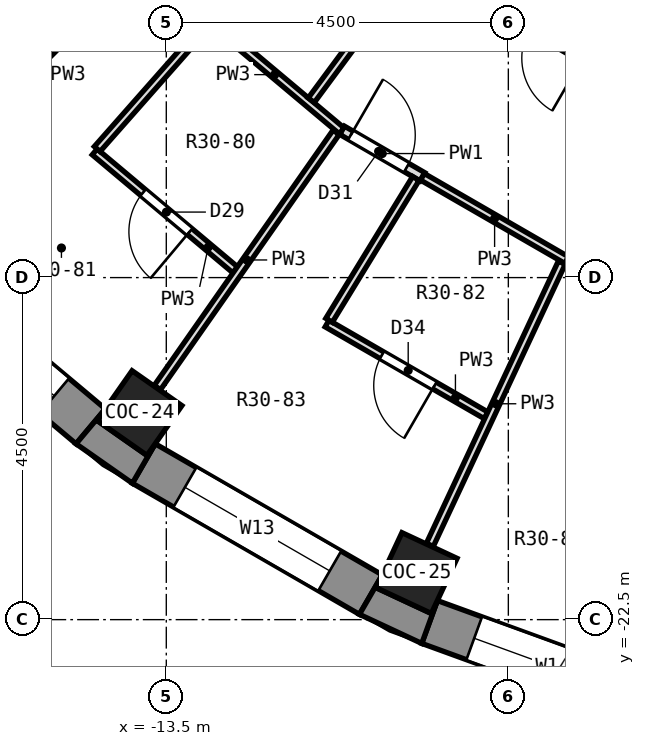
"""IFC4 building model, lengths in metres.
Left out: names, types, materials, properties, quantities, classifications, styles, units other than length and angle.
Written with IfcOpenShell. Run it as: python <this file> out.ifc"""

import sys

from ifc_helpers import new_model, si_unit, direction, frame, frame_2d, origin, origin_2d, place, context, subcontext, project, spatial, polyline, rectangle, outline, extrude, element, fill, save


model = new_model("IFC4")
c1 = context("Model", 3, precision=1e-05, world=origin(), true_north=direction((0.0, 1.0)))
c2 = subcontext(c1, "Body", "Model", "MODEL_VIEW")
j1 = project(units=[si_unit("LENGTHUNIT", "METRE"), si_unit("PLANEANGLEUNIT", "RADIAN")], contexts=[c1])
p1 = place(None, origin())
s1 = spatial("IfcSite", under=j1, at=p1, CompositionType="ELEMENT")
p2 = place(p1, origin())
s2 = spatial("IfcBuilding", under=s1, at=p2, CompositionType="ELEMENT")
p3 = place(p2, frame((0.0, 0.0, 210.3)))
s3 = spatial("IfcBuildingStorey", under=s2, at=p3, CompositionType="ELEMENT", Elevation=210.3)
for number, where, z_axis, x_axis in (
    (1, (-13.852, -19.782, 0.0), (0.0, 0.0, 1.0), (-0.574, -0.819, 0.0)),
    (2, (-10.206, -21.887, 0.0), (0.0, 0.0, 1.0), (-0.423, -0.906, 0.0)),
):
    element("IfcColumn", number, at=place(p3, frame(where, z_axis=z_axis, x_axis=x_axis)), inside=s3, PredefinedType="COLUMN", context=c2, shape_type="SweptSolid", body=[
        extrude(rectangle(XDim=0.8, YDim=0.8, at=origin_2d()), origin(), (0.0, 0.0, 1.0), 3.3),
    ])
p4 = place(p3, frame((-17.137, -17.74, 0.0), z_axis=(0.0, 0.0, 1.0), x_axis=(0.766058884809, -0.642770398358, 0.0)))
e3 = element("IfcWall", 3, at=p4, inside=s3, PredefinedType="SOLIDWALL", context=c2, shape_type="SweptSolid", body=[
    extrude(rectangle(XDim=3.449, YDim=0.6, at=frame_2d((1.725, 0.0))), origin(), (0.0, 0.0, 1.0), 2.85),
])
p5 = place(p4, frame((0.625, 0.0, 0.9)))
e4 = element("IfcOpeningElement", 4, at=p5, cuts=e3, PredefinedType="OPENING", context=c2, shape_type="SweptSolid", body=[
    extrude(rectangle(XDim=2.2, YDim=1.8, at=frame_2d((1.1, 0.9))), frame((0.0, 0.312, 0.0), z_axis=(0.0, -1.0, 0.0), x_axis=(1.0, 0.0, 0.0)), (0.0, 0.0, 1.0), 0.624),
])
p6 = place(p3, frame((-13.796, -20.446, 0.0), z_axis=(0.0, 0.0, 1.0), x_axis=(0.86602648383, -0.499998129301, 0.0)))
e5 = element("IfcWall", 5, at=p6, inside=s3, PredefinedType="SOLIDWALL", context=c2, shape_type="SweptSolid", body=[
    extrude(rectangle(XDim=3.45, YDim=0.6, at=frame_2d((1.725, 0.0))), origin(), (0.0, 0.0, 1.0), 2.85),
])
p7 = place(p6, frame((0.625, 0.0, 0.9)))
e6 = element("IfcOpeningElement", 6, at=p7, cuts=e5, PredefinedType="OPENING", context=c2, shape_type="SweptSolid", body=[
    extrude(rectangle(XDim=2.2, YDim=1.8, at=frame_2d((1.1, 0.9))), frame((0.0, 0.312, 0.0), z_axis=(0.0, -1.0, 0.0), x_axis=(1.0, 0.0, 0.0)), (0.0, 0.0, 1.0), 0.624),
])
p8 = place(p3, frame((-10.036, -22.531, 0.0), z_axis=(0.0, 0.0, 1.0), x_axis=(0.93968799822, -0.342032843455, 0.0)))
e7 = element("IfcWall", 7, at=p8, inside=s3, PredefinedType="SOLIDWALL", context=c2, shape_type="SweptSolid", body=[
    extrude(rectangle(XDim=3.45, YDim=0.6, at=frame_2d((1.725, 0.0))), origin(), (0.0, 0.0, 1.0), 2.85),
])
p9 = place(p8, frame((0.625, 0.0, 0.9)))
e8 = element("IfcOpeningElement", 8, at=p9, cuts=e7, PredefinedType="OPENING", context=c2, shape_type="SweptSolid", body=[
    extrude(rectangle(XDim=2.2, YDim=1.8, at=frame_2d((1.1, 0.9))), frame((0.0, 0.312, 0.0), z_axis=(0.0, -1.0, 0.0), x_axis=(1.0, 0.0, 0.0)), (0.0, 0.0, 1.0), 0.624),
])
p10 = place(p3, origin())
e9 = element("IfcWall", 9, at=p10, inside=s3, PredefinedType="SOLIDWALL", context=c2, shape_type="SweptSolid", body=[
    extrude(outline(polyline([(-14.687, -20.187), (-13.946, -20.706), (-13.646, -20.186), (-13.754, -20.34), (-14.409, -19.881), (-14.302, -19.727), (-14.687, -20.187)])), origin(), (0.0, 0.0, 1.0), 2.85),
])
p11 = place(p3, origin())
e10 = element("IfcWall", 10, at=p11, inside=s3, PredefinedType="SOLIDWALL", context=c2, shape_type="SweptSolid", body=[
    extrude(outline(polyline([(-10.139, -22.813), (-9.934, -22.249), (-10.013, -22.419), (-10.738, -22.081), (-10.659, -21.911), (-10.959, -22.431), (-10.139, -22.813)])), origin(), (0.0, 0.0, 1.0), 2.85),
])
p12 = place(p3, frame((-14.442, -16.346, 0.0), z_axis=(0.0, 0.0, 1.0), x_axis=(0.765878189611, -0.642985690882, 0.0)))
e11 = element("IfcWall", 11, at=p12, inside=s3, PredefinedType="PARTITIONING", context=c2, shape_type="SweptSolid", body=[
    extrude(rectangle(XDim=2.414, YDim=0.1, at=frame_2d((1.207, 0.0))), origin(), (0.0, 0.0, 1.0), 2.85),
])
p13 = place(p12, frame((0.832, 0.0, 0.0)))
e12 = element("IfcOpeningElement", 12, at=p13, cuts=e11, PredefinedType="OPENING", context=c2, shape_type="SweptSolid", body=[
    extrude(rectangle(XDim=0.8, YDim=2.1, at=frame_2d((0.4, 1.05))), frame((0.0, 0.062, 0.0), z_axis=(0.0, -1.0, 0.0), x_axis=(1.0, 0.0, 0.0)), (0.0, 0.0, 1.0), 0.124),
])
p14 = place(p3, frame((-12.957, -14.589, 0.0), z_axis=(0.0, 0.0, 1.0), x_axis=(0.766099024104, -0.642722556993, 0.0)))
e13 = element("IfcWall", 13, at=p14, inside=s3, PredefinedType="PARTITIONING", context=c2, shape_type="SweptSolid", body=[
    extrude(rectangle(XDim=2.305, YDim=0.1, at=frame_2d((1.153, 0.0))), origin(), (0.0, 0.0, 1.0), 2.85),
])
p15 = place(p3, frame((-11.186, -16.062, 0.0), z_axis=(0.0, 0.0, 1.0), x_axis=(0.865261949816, -0.501320015759, 0.0)))
e14 = element("IfcWall", 14, at=p15, inside=s3, PredefinedType="PARTITIONING", context=c2, shape_type="SweptSolid", body=[
    extrude(rectangle(XDim=1.221, YDim=0.125, at=frame_2d((0.61, 0.0))), origin(), (0.0, 0.0, 1.0), 2.85),
])
p16 = place(p15, frame((0.129, 0.0, 0.0)))
e15 = element("IfcOpeningElement", 15, at=p16, cuts=e14, PredefinedType="OPENING", context=c2, shape_type="SweptSolid", body=[
    extrude(rectangle(XDim=0.85, YDim=2.1, at=frame_2d((0.425, 1.05))), frame((0.0, 0.074, 0.0), z_axis=(0.0, -1.0, 0.0), x_axis=(1.0, 0.0, 0.0)), (0.0, 0.0, 1.0), 0.149),
])
p17 = place(p3, frame((-11.385, -18.605, 0.0), z_axis=(0.0, 0.0, 1.0), x_axis=(0.866145191815, -0.499792463624, 0.0)))
e16 = element("IfcWall", 16, at=p17, inside=s3, PredefinedType="PARTITIONING", context=c2, shape_type="SweptSolid", body=[
    extrude(rectangle(XDim=2.415, YDim=0.1, at=frame_2d((1.208, 0.0))), origin(), (0.0, 0.0, 1.0), 2.85),
])
p18 = place(p17, frame((0.833, 0.0, 0.0)))
e17 = element("IfcOpeningElement", 17, at=p18, cuts=e16, PredefinedType="OPENING", context=c2, shape_type="SweptSolid", body=[
    extrude(rectangle(XDim=0.8, YDim=2.1, at=frame_2d((0.4, 1.05))), frame((0.0, 0.062, 0.0), z_axis=(0.0, -1.0, 0.0), x_axis=(1.0, 0.0, 0.0)), (0.0, 0.0, 1.0), 0.124),
])
p19 = place(p3, frame((-10.13, -16.674, 0.0), z_axis=(0.0, 0.0, 1.0), x_axis=(0.866104006239, -0.499863831834, 0.0)))
e18 = element("IfcWall", 18, at=p19, inside=s3, PredefinedType="PARTITIONING", context=c2, shape_type="SweptSolid", body=[
    extrude(rectangle(XDim=2.192, YDim=0.1, at=frame_2d((1.096, 0.0))), origin(), (0.0, 0.0, 1.0), 2.85),
])
p20 = place(p3, frame((-9.326, -14.361, 0.0), z_axis=(0.0, 0.0, 1.0), x_axis=(0.866099077695, -0.499872371326, 0.0)))
e19 = element("IfcWall", 19, at=p20, inside=s3, PredefinedType="PARTITIONING", context=c2, shape_type="SweptSolid", body=[
    extrude(rectangle(XDim=2.208, YDim=0.1, at=frame_2d((1.104, 0.0))), origin(), (0.0, 0.0, 1.0), 2.85),
])
p21 = place(p20, frame((0.704, 0.0, 0.0)))
e20 = element("IfcOpeningElement", 20, at=p21, cuts=e19, PredefinedType="OPENING", context=c2, shape_type="SweptSolid", body=[
    extrude(rectangle(XDim=0.8, YDim=2.1, at=frame_2d((0.4, 1.05))), frame((0.0, 0.062, 0.0), z_axis=(0.0, -1.0, 0.0), x_axis=(1.0, 0.0, 0.0)), (0.0, 0.0, 1.0), 0.124),
])
p22 = place(p3, frame((-10.927, -11.012, 0.0), z_axis=(0.0, 0.0, 1.0), x_axis=(0.866043138087, -0.49996928203, 0.0)))
e21 = element("IfcWall", 21, at=p22, inside=s3, PredefinedType="PARTITIONING", context=c2, shape_type="SweptSolid", body=[
    extrude(rectangle(XDim=8.048, YDim=0.125, at=frame_2d((4.024, 0.0))), origin(), (0.0, 0.0, 1.0), 2.85),
])
p23 = place(p22, frame((6.042, 0.0, 0.0)))
e22 = element("IfcOpeningElement", 22, at=p23, cuts=e21, PredefinedType="OPENING", context=c2, shape_type="SweptSolid", body=[
    extrude(rectangle(XDim=1.0, YDim=2.1, at=frame_2d((0.5, 1.05))), frame((0.0, 0.074, 0.0), z_axis=(0.0, -1.0, 0.0), x_axis=(1.0, 0.0, 0.0)), (0.0, 0.0, 1.0), 0.149),
])
p24 = place(p3, frame((-16.787, -16.787, 0.0), z_axis=(0.0, 0.0, 1.0), x_axis=(0.707106781187, 0.707106781187, 0.0)))
e23 = element("IfcWall", 23, at=p24, inside=s3, PredefinedType="PARTITIONING", context=c2, shape_type="SweptSolid", body=[
    extrude(rectangle(XDim=4.098, YDim=0.1, at=frame_2d((2.049, 0.0))), origin(), (0.0, 0.0, 1.0), 2.85),
])
p25 = place(p3, frame((-14.409, -16.309, 0.0), z_axis=(0.0, 0.0, 1.0), x_axis=(0.661846667472, 0.749639239072, 0.0)))
e24 = element("IfcWall", 24, at=p25, inside=s3, PredefinedType="PARTITIONING", context=c2, shape_type="SweptSolid", body=[
    extrude(rectangle(XDim=2.188, YDim=0.1, at=frame_2d((1.094, 0.0))), origin(), (0.0, 0.0, 1.0), 2.85),
])
p26 = place(p3, frame((-11.593, -15.667, 0.0), z_axis=(0.0, 0.0, 1.0), x_axis=(0.594790535758, 0.803880724096, 0.0)))
e25 = element("IfcWall", 25, at=p26, inside=s3, PredefinedType="PARTITIONING", context=c2, shape_type="SweptSolid", body=[
    extrude(rectangle(XDim=4.33, YDim=0.1, at=frame_2d((2.165, 0.0))), origin(), (0.0, 0.0, 1.0), 2.85),
])
p27 = place(p26, frame((1.421, 0.0, 0.0)))
e26 = element("IfcOpeningElement", 26, at=p27, cuts=e25, PredefinedType="OPENING", context=c2, shape_type="SweptSolid", body=[
    extrude(rectangle(XDim=0.9, YDim=2.1, at=frame_2d((0.45, 1.05))), frame((0.0, 0.062, 0.0), z_axis=(0.0, -1.0, 0.0), x_axis=(1.0, 0.0, 0.0)), (0.0, 0.0, 1.0), 0.124),
])
p28 = place(p3, frame((-13.617, -19.447, 0.0), z_axis=(0.0, 0.0, 1.0), x_axis=(0.573606249772, 0.819131167898, 0.0)))
e27 = element("IfcWall", 27, at=p28, inside=s3, PredefinedType="PARTITIONING", context=c2, shape_type="SweptSolid", body=[
    extrude(rectangle(XDim=4.099, YDim=0.1, at=frame_2d((2.049, 0.0))), origin(), (0.0, 0.0, 1.0), 2.85),
])
p29 = place(p3, frame((-11.359, -18.562, 0.0), z_axis=(0.0, 0.0, 1.0), x_axis=(0.522122387349, 0.852870572026, 0.0)))
e28 = element("IfcWall", 28, at=p29, inside=s3, PredefinedType="PARTITIONING", context=c2, shape_type="SweptSolid", body=[
    extrude(rectangle(XDim=2.188, YDim=0.1, at=frame_2d((1.094, 0.0))), origin(), (0.0, 0.0, 1.0), 2.85),
])
p30 = place(p3, frame((-10.032, -21.516, 0.0), z_axis=(0.0, 0.0, 1.0), x_axis=(0.423514808753, 0.90588918018, 0.0)))
e29 = element("IfcWall", 29, at=p30, inside=s3, PredefinedType="PARTITIONING", context=c2, shape_type="SweptSolid", body=[
    extrude(rectangle(XDim=4.098, YDim=0.1, at=frame_2d((2.049, 0.0))), origin(), (0.0, 0.0, 1.0), 2.85),
])
p31 = place(p5, origin())
e30 = element("IfcWindow", 30, at=p31, inside=s3, PartitioningType="SINGLE_PANEL", PredefinedType="WINDOW", context=c2, shape_type="SweptSolid", body=[
    extrude(rectangle(XDim=2.2, YDim=1.8, at=frame_2d((1.1, 0.9))), frame((0.0, 0.18, 0.0), z_axis=(0.0, -1.0, 0.0), x_axis=(1.0, 0.0, 0.0)), (0.0, 0.0, 1.0), 0.06),
])
fill(e4, e30)
p32 = place(p7, origin())
e31 = element("IfcWindow", 31, at=p32, inside=s3, PartitioningType="SINGLE_PANEL", PredefinedType="WINDOW", context=c2, shape_type="SweptSolid", body=[
    extrude(rectangle(XDim=2.2, YDim=1.8, at=frame_2d((1.1, 0.9))), frame((0.0, 0.18, 0.0), z_axis=(0.0, -1.0, 0.0), x_axis=(1.0, 0.0, 0.0)), (0.0, 0.0, 1.0), 0.06),
])
fill(e6, e31)
p33 = place(p9, origin())
e32 = element("IfcWindow", 32, at=p33, inside=s3, PartitioningType="SINGLE_PANEL", PredefinedType="WINDOW", context=c2, shape_type="SweptSolid", body=[
    extrude(rectangle(XDim=2.2, YDim=1.8, at=frame_2d((1.1, 0.9))), frame((0.0, 0.18, 0.0), z_axis=(0.0, -1.0, 0.0), x_axis=(1.0, 0.0, 0.0)), (0.0, 0.0, 1.0), 0.06),
])
fill(e8, e32)
p34 = place(p13, frame((0.8, 0.0, 0.0), z_axis=(0.0, 0.0, 1.0), x_axis=(-1.0, 0.0, 0.0)))
e33 = element("IfcDoor", 33, at=p34, inside=s3, OperationType="SINGLE_SWING_LEFT", PredefinedType="DOOR", context=c2, shape_type="SweptSolid", body=[
    extrude(rectangle(XDim=0.8, YDim=2.1, at=frame_2d((0.4, 1.05))), frame((0.0, 0.025, 0.0), z_axis=(0.0, -1.0, 0.0), x_axis=(1.0, 0.0, 0.0)), (0.0, 0.0, 1.0), 0.05),
])
fill(e12, e33)
p35 = place(p16, origin())
e34 = element("IfcDoor", 34, at=p35, inside=s3, OperationType="SINGLE_SWING_LEFT", PredefinedType="DOOR", context=c2, shape_type="SweptSolid", body=[
    extrude(rectangle(XDim=0.85, YDim=2.1, at=frame_2d((0.425, 1.05))), frame((0.0, 0.025, 0.0), z_axis=(0.0, -1.0, 0.0), x_axis=(1.0, 0.0, 0.0)), (0.0, 0.0, 1.0), 0.05),
])
fill(e15, e34)
p36 = place(p21, frame((0.8, 0.0, 0.0), z_axis=(0.0, 0.0, 1.0), x_axis=(-1.0, 0.0, 0.0)))
e35 = element("IfcDoor", 35, at=p36, inside=s3, OperationType="SINGLE_SWING_LEFT", PredefinedType="DOOR", context=c2, shape_type="SweptSolid", body=[
    extrude(rectangle(XDim=0.8, YDim=2.1, at=frame_2d((0.4, 1.05))), frame((0.0, 0.025, 0.0), z_axis=(0.0, -1.0, 0.0), x_axis=(1.0, 0.0, 0.0)), (0.0, 0.0, 1.0), 0.05),
])
fill(e20, e35)
p37 = place(p18, frame((0.8, 0.0, 0.0), z_axis=(0.0, 0.0, 1.0), x_axis=(-1.0, 0.0, 0.0)))
e36 = element("IfcDoor", 36, at=p37, inside=s3, OperationType="SINGLE_SWING_LEFT", PredefinedType="DOOR", context=c2, shape_type="SweptSolid", body=[
    extrude(rectangle(XDim=0.8, YDim=2.1, at=frame_2d((0.4, 1.05))), frame((0.0, 0.025, 0.0), z_axis=(0.0, -1.0, 0.0), x_axis=(1.0, 0.0, 0.0)), (0.0, 0.0, 1.0), 0.05),
])
fill(e17, e36)
save(model, sys.argv[1])
